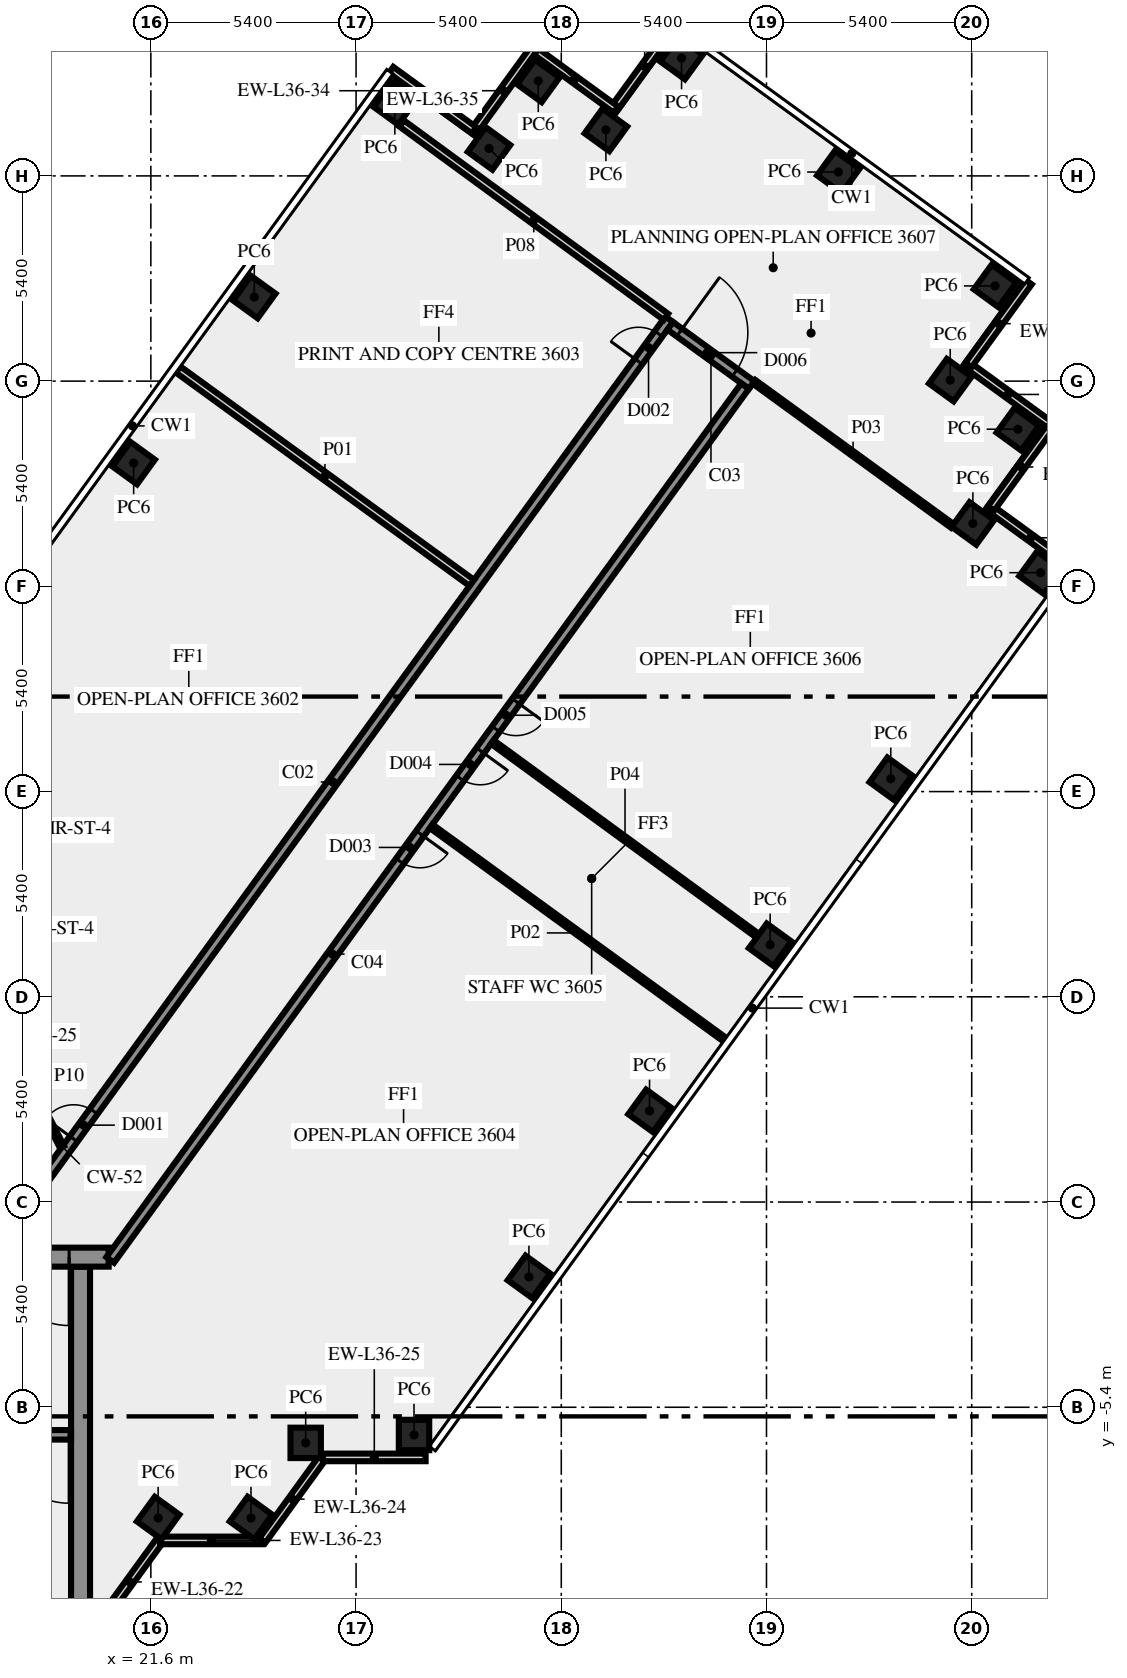
"""IFC4 building model, lengths in metres.
Left out: names, types, materials, properties, quantities, classifications, styles, units other than length and angle.
Written with IfcOpenShell. Run it as: python <this file> out.ifc"""

import sys

from ifc_helpers import new_model, si_unit, direction, frame, frame_2d, origin, origin_2d, place, context, subcontext, project, spatial, rectangle, extrude, element, fill, save


model = new_model("IFC4")
c1 = context("Model", 3, precision=1e-05, world=origin(), true_north=direction((0.0, 1.0)))
c2 = subcontext(c1, "Body", "Model", "MODEL_VIEW")
j1 = project(units=[si_unit("LENGTHUNIT", "METRE"), si_unit("PLANEANGLEUNIT", "RADIAN")], contexts=[c1])
p1 = place(None, origin())
s1 = spatial("IfcSite", under=j1, at=p1, CompositionType="ELEMENT")
p2 = place(p1, origin())
s2 = spatial("IfcBuilding", under=s1, at=p2, CompositionType="ELEMENT")
p3 = place(p2, frame((0.0, 0.0, 156.0)))
s3 = spatial("IfcBuildingStorey", under=s2, at=p3, CompositionType="ELEMENT", Elevation=156.0)
for number, where, z_axis, x_axis in (
    (1, (21.792, -8.315, 0.0), (0.0, 0.0, 1.0), (0.588, 0.809, 0.0)),
    (2, (24.235, -8.315, 0.0), (0.0, 0.0, 1.0), (0.588, 0.809, 0.0)),
    (3, (25.674, -6.337, 0.0), (0.0, 0.0, 1.0), (1.0, 0.0, 0.0)),
    (4, (28.525, -6.13, 0.0), (0.0, 0.0, 1.0), (1.0, 0.0, 0.0)),
    (5, (31.548, -1.969, 0.0), (0.0, 0.0, 1.0), (0.588, 0.809, 0.0)),
    (6, (34.722, 2.4, 0.0), (0.0, 0.0, 1.0), (0.588, 0.809, 0.0)),
    (7, (37.896, 6.769, 0.0), (0.0, 0.0, 1.0), (0.588, 0.809, 0.0)),
    (8, (41.07, 11.137, 0.0), (0.0, 0.0, 1.0), (0.588, 0.809, 0.0)),
    (9, (45.01, 16.56, 0.0), (0.0, 0.0, 1.0), (0.588, 0.809, 0.0)),
    (10, (43.231, 17.854, 0.0), (0.0, 0.0, 1.0), (0.588, 0.809, 0.0)),
    (11, (44.415, 20.335, 0.0), (0.0, 0.0, 1.0), (0.588, 0.809, 0.0)),
    (12, (42.635, 21.626, 0.0), (0.0, 0.0, 1.0), (-0.809, 0.588, 0.0)),
    (13, (43.815, 24.105, 0.0), (0.0, 0.0, 1.0), (-0.809, 0.588, 0.0)),
    (14, (39.691, 27.102, 0.0), (0.0, 0.0, 1.0), (-0.809, 0.588, 0.0)),
    (15, (35.565, 30.1, 0.0), (0.0, 0.0, 1.0), (-0.588, -0.809, 0.0)),
    (16, (33.574, 28.209, 0.0), (0.0, 0.0, 1.0), (-0.809, 0.588, 0.0)),
    (17, (31.795, 29.5, 0.0), (0.0, 0.0, 1.0), (-0.588, -0.809, 0.0)),
    (18, (30.499, 27.723, 0.0), (0.0, 0.0, 1.0), (-0.809, 0.588, 0.0)),
    (19, (28.02, 28.905, 0.0), (0.0, 0.0, 1.0), (-0.809, 0.588, 0.0)),
    (20, (24.321, 23.812, 0.0), (0.0, 0.0, 1.0), (-0.588, -0.809, 0.0)),
    (21, (21.147, 19.444, 0.0), (0.0, 0.0, 1.0), (-0.588, -0.809, 0.0)),
):
    element("IfcColumn", number, at=place(p3, frame(where, z_axis=z_axis, x_axis=x_axis)), inside=s3, PredefinedType="COLUMN", context=c2, shape_type="SweptSolid", body=[
        extrude(rectangle(XDim=0.8, YDim=0.8, at=origin_2d()), origin(), (0.0, 0.0, 1.0), 3.65),
    ])
p4 = place(p3, frame((20.253, -11.083, 0.0), z_axis=(0.0, 0.0, 1.0), x_axis=(0.587766567315, 0.809030569476, 0.0)))
e22 = element("IfcWall", 22, at=p4, inside=s3, PredefinedType="SOLIDWALL", context=c2, shape_type="SweptSolid", body=[
    extrude(rectangle(XDim=2.688, YDim=0.2, at=frame_2d((1.344, 0.0))), origin(), (0.0, 0.0, 1.0), 3.65),
])
p5 = place(p3, frame((21.843, -8.904, 0.0), z_axis=(0.0, 0.0, 1.0), x_axis=(1.0, 0.0, 0.0)))
e23 = element("IfcWall", 23, at=p5, inside=s3, PredefinedType="SOLIDWALL", context=c2, shape_type="SweptSolid", body=[
    extrude(rectangle(XDim=2.7, YDim=0.2, at=frame_2d((1.35, 0.0))), origin(), (0.0, 0.0, 1.0), 3.65),
])
p6 = place(p3, frame((24.533, -8.909, 0.0), z_axis=(0.0, 0.0, 1.0), x_axis=(0.587720002413, 0.809064397168, 0.0)))
e24 = element("IfcWall", 24, at=p6, inside=s3, PredefinedType="SOLIDWALL", context=c2, shape_type="SweptSolid", body=[
    extrude(rectangle(XDim=2.7, YDim=0.2, at=frame_2d((1.35, 0.0))), origin(), (0.0, 0.0, 1.0), 3.65),
])
for number, where, z_axis, x_axis in (
    (25, (26.13, -6.719, 0.0), (0.0, 0.0, 1.0), (1.0, 0.0, 0.0)),
    (26, (45.842, 16.685, 0.0), (0.0, 0.0, 1.0), (-0.809, 0.588, 0.0)),
    (27, (43.709, 18.249, 0.0), (0.0, 0.0, 1.0), (0.588, 0.809, 0.0)),
    (28, (45.245, 20.456, 0.0), (0.0, 0.0, 1.0), (-0.809, 0.588, 0.0)),
    (29, (43.113, 22.02, 0.0), (0.0, 0.0, 1.0), (0.588, 0.809, 0.0)),
    (30, (35.388, 30.97, 0.0), (0.0, 0.0, 1.0), (-0.588, -0.809, 0.0)),
    (31, (33.838, 28.744, 0.0), (0.0, 0.0, 1.0), (-0.809, 0.588, 0.0)),
    (32, (31.67, 30.333, 0.0), (0.0, 0.0, 1.0), (-0.588, -0.809, 0.0)),
    (33, (30.106, 28.2, 0.0), (0.0, 0.0, 1.0), (-0.809, 0.588, 0.0)),
):
    element("IfcWall", number, at=place(p3, frame(where, z_axis=z_axis, x_axis=x_axis)), inside=s3, PredefinedType="SOLIDWALL", context=c2, shape_type="SweptSolid", body=[
        extrude(rectangle(XDim=2.7, YDim=0.2, at=frame_2d((1.35, 0.0))), origin(), (0.0, 0.0, 1.0), 3.65),
    ])
p7 = place(p3, frame((19.75, -10.5, 0.0), z_axis=(0.0, 0.0, 1.0), x_axis=(0.0, 1.0, 0.0)))
e34 = element("IfcWall", 34, at=p7, inside=s3, PredefinedType="SHEAR", context=c2, shape_type="SweptSolid", body=[
    extrude(rectangle(XDim=8.8, YDim=0.5, at=frame_2d((4.4, 0.0))), origin(), (0.0, 0.0, 1.0), 3.65),
])
p8 = place(p3, frame((19.5, -6.125, 0.0), z_axis=(0.0, 0.0, 1.0), x_axis=(-1.0, 0.0, 0.0)))
e35 = element("IfcWall", 35, at=p8, inside=s3, PredefinedType="SHEAR", context=c2, shape_type="SweptSolid", body=[
    extrude(rectangle(XDim=8.05, YDim=0.25, at=frame_2d((4.025, 0.0))), origin(), (0.0, 0.0, 1.0), 3.65),
])
p9 = place(p8, frame((0.05, 0.0, 0.0)))
e36 = element("IfcOpeningElement", 36, at=p9, cuts=e35, PredefinedType="OPENING", context=c2, shape_type="SweptSolid", body=[
    extrude(rectangle(XDim=1.8, YDim=2.1, at=frame_2d((0.9, 1.05))), frame((0.0, 0.135, 0.0), z_axis=(0.0, -1.0, 0.0), x_axis=(1.0, 0.0, 0.0)), (0.0, 0.0, 1.0), 0.27),
])
p10 = place(p3, frame((20.49, -1.45, 0.0), z_axis=(0.0, 0.0, 1.0), x_axis=(-1.0, 0.0, 0.0)))
e37 = element("IfcWall", 37, at=p10, inside=s3, PredefinedType="SHEAR", context=c2, shape_type="SweptSolid", body=[
    extrude(rectangle(XDim=40.98, YDim=0.5, at=frame_2d((20.49, 0.0))), origin(), (0.0, 0.0, 1.0), 3.65),
])
p11 = place(p10, frame((38.14, 0.0, 0.0)))
e38 = element("IfcOpeningElement", 38, at=p11, cuts=e37, PredefinedType="OPENING", context=c2, shape_type="SweptSolid", body=[
    extrude(rectangle(XDim=1.8, YDim=2.1, at=frame_2d((0.9, 1.05))), frame((0.0, 0.26, 0.0), z_axis=(0.0, -1.0, 0.0), x_axis=(1.0, 0.0, 0.0)), (0.0, 0.0, 1.0), 0.52),
])
p12 = place(p10, frame((35.89, 0.0, 0.0)))
e39 = element("IfcOpeningElement", 39, at=p12, cuts=e37, PredefinedType="OPENING", context=c2, shape_type="SweptSolid", body=[
    extrude(rectangle(XDim=0.9, YDim=2.1, at=frame_2d((0.45, 1.05))), frame((0.0, 0.26, 0.0), z_axis=(0.0, -1.0, 0.0), x_axis=(1.0, 0.0, 0.0)), (0.0, 0.0, 1.0), 0.52),
])
p13 = place(p10, frame((32.94, 0.0, 0.0)))
e40 = element("IfcOpeningElement", 40, at=p13, cuts=e37, PredefinedType="OPENING", context=c2, shape_type="SweptSolid", body=[
    extrude(rectangle(XDim=0.9, YDim=2.1, at=frame_2d((0.45, 1.05))), frame((0.0, 0.26, 0.0), z_axis=(0.0, -1.0, 0.0), x_axis=(1.0, 0.0, 0.0)), (0.0, 0.0, 1.0), 0.52),
])
p14 = place(p10, frame((28.802, 0.0, 0.0)))
e41 = element("IfcOpeningElement", 41, at=p14, cuts=e37, PredefinedType="OPENING", context=c2, shape_type="SweptSolid", body=[
    extrude(rectangle(XDim=0.9, YDim=2.1, at=frame_2d((0.45, 1.05))), frame((0.0, 0.26, 0.0), z_axis=(0.0, -1.0, 0.0), x_axis=(1.0, 0.0, 0.0)), (0.0, 0.0, 1.0), 0.52),
])
p15 = place(p10, frame((25.077, 0.0, 0.0)))
e42 = element("IfcOpeningElement", 42, at=p15, cuts=e37, PredefinedType="OPENING", context=c2, shape_type="SweptSolid", body=[
    extrude(rectangle(XDim=0.9, YDim=2.1, at=frame_2d((0.45, 1.05))), frame((0.0, 0.26, 0.0), z_axis=(0.0, -1.0, 0.0), x_axis=(1.0, 0.0, 0.0)), (0.0, 0.0, 1.0), 0.52),
])
p16 = place(p10, frame((21.765, 0.0, 0.0)))
e43 = element("IfcOpeningElement", 43, at=p16, cuts=e37, PredefinedType="OPENING", context=c2, shape_type="SweptSolid", body=[
    extrude(rectangle(XDim=2.0, YDim=2.1, at=frame_2d((1.0, 1.05))), frame((0.0, 0.26, 0.0), z_axis=(0.0, -1.0, 0.0), x_axis=(1.0, 0.0, 0.0)), (0.0, 0.0, 1.0), 0.52),
])
p17 = place(p10, frame((7.14, 0.0, 0.0)))
e44 = element("IfcOpeningElement", 44, at=p17, cuts=e37, PredefinedType="OPENING", context=c2, shape_type="SweptSolid", body=[
    extrude(rectangle(XDim=0.9, YDim=2.1, at=frame_2d((0.45, 1.05))), frame((0.0, 0.26, 0.0), z_axis=(0.0, -1.0, 0.0), x_axis=(1.0, 0.0, 0.0)), (0.0, 0.0, 1.0), 0.52),
])
p18 = place(p10, frame((5.028, 0.0, 0.0)))
e45 = element("IfcOpeningElement", 45, at=p18, cuts=e37, PredefinedType="OPENING", context=c2, shape_type="SweptSolid", body=[
    extrude(rectangle(XDim=0.8, YDim=2.1, at=frame_2d((0.4, 1.05))), frame((0.0, 0.26, 0.0), z_axis=(0.0, -1.0, 0.0), x_axis=(1.0, 0.0, 0.0)), (0.0, 0.0, 1.0), 0.52),
])
p19 = place(p10, frame((3.452, 0.0, 0.0)))
e46 = element("IfcOpeningElement", 46, at=p19, cuts=e37, PredefinedType="OPENING", context=c2, shape_type="SweptSolid", body=[
    extrude(rectangle(XDim=0.8, YDim=2.1, at=frame_2d((0.4, 1.05))), frame((0.0, 0.26, 0.0), z_axis=(0.0, -1.0, 0.0), x_axis=(1.0, 0.0, 0.0)), (0.0, 0.0, 1.0), 0.52),
])
p20 = place(p10, frame((1.04, 0.0, 0.0)))
e47 = element("IfcOpeningElement", 47, at=p20, cuts=e37, PredefinedType="OPENING", context=c2, shape_type="SweptSolid", body=[
    extrude(rectangle(XDim=1.8, YDim=2.1, at=frame_2d((0.9, 1.05))), frame((0.0, 0.26, 0.0), z_axis=(0.0, -1.0, 0.0), x_axis=(1.0, 0.0, 0.0)), (0.0, 0.0, 1.0), 0.52),
])
p21 = place(p3, frame((17.545, -1.125, 0.0), z_axis=(0.0, 0.0, 1.0), x_axis=(0.587786330937, 0.809016210693, 0.0)))
e48 = element("IfcWall", 48, at=p21, inside=s3, PredefinedType="SOLIDWALL", context=c2, shape_type="SweptSolid", body=[
    extrude(rectangle(XDim=30.103, YDim=0.25, at=frame_2d((15.052, 0.0))), origin(), (0.0, 0.0, 1.0), 3.65),
])
p22 = place(p21, frame((3.441, 0.0, 0.0)))
e49 = element("IfcOpeningElement", 49, at=p22, cuts=e48, PredefinedType="OPENING", context=c2, shape_type="SweptSolid", body=[
    extrude(rectangle(XDim=0.9, YDim=2.1, at=frame_2d((0.45, 1.05))), frame((0.0, 0.135, 0.0), z_axis=(0.0, -1.0, 0.0), x_axis=(1.0, 0.0, 0.0)), (0.0, 0.0, 1.0), 0.27),
])
p23 = place(p21, frame((28.729, 0.0, 0.0)))
e50 = element("IfcOpeningElement", 50, at=p23, cuts=e48, PredefinedType="OPENING", context=c2, shape_type="SweptSolid", body=[
    extrude(rectangle(XDim=0.9, YDim=2.1, at=frame_2d((0.45, 1.05))), frame((0.0, 0.135, 0.0), z_axis=(0.0, -1.0, 0.0), x_axis=(1.0, 0.0, 0.0)), (0.0, 0.0, 1.0), 0.27),
])
p24 = place(p3, frame((35.267, 23.054, 0.0), z_axis=(0.0, 0.0, 1.0), x_axis=(0.809038743598, -0.587755315891, 0.0)))
e51 = element("IfcWall", 51, at=p24, inside=s3, PredefinedType="SOLIDWALL", context=c2, shape_type="SweptSolid", body=[
    extrude(rectangle(XDim=2.65, YDim=0.25, at=frame_2d((1.325, 0.0))), origin(), (0.0, 0.0, 1.0), 3.65),
])
p25 = place(p24, frame((0.3, 0.0, 0.0)))
e52 = element("IfcOpeningElement", 52, at=p25, cuts=e51, PredefinedType="OPENING", context=c2, shape_type="SweptSolid", body=[
    extrude(rectangle(XDim=1.8, YDim=2.1, at=frame_2d((0.9, 1.05))), frame((0.0, 0.135, 0.0), z_axis=(0.0, -1.0, 0.0), x_axis=(1.0, 0.0, 0.0)), (0.0, 0.0, 1.0), 0.27),
])
p26 = place(p3, frame((37.236, 21.469, 0.0), z_axis=(0.0, 0.0, 1.0), x_axis=(-0.58778344073, -0.809018310549, 0.0)))
e53 = element("IfcWall", 53, at=p26, inside=s3, PredefinedType="SOLIDWALL", context=c2, shape_type="SweptSolid", body=[
    extrude(rectangle(XDim=28.42, YDim=0.25, at=frame_2d((14.21, 0.0))), origin(), (0.0, 0.0, 1.0), 3.65),
])
p27 = place(p26, frame((14.554, 0.0, 0.0)))
e54 = element("IfcOpeningElement", 54, at=p27, cuts=e53, PredefinedType="OPENING", context=c2, shape_type="SweptSolid", body=[
    extrude(rectangle(XDim=0.9, YDim=2.1, at=frame_2d((0.45, 1.05))), frame((0.0, 0.135, 0.0), z_axis=(0.0, -1.0, 0.0), x_axis=(1.0, 0.0, 0.0)), (0.0, 0.0, 1.0), 0.27),
])
p28 = place(p26, frame((10.255, 0.0, 0.0)))
e55 = element("IfcOpeningElement", 55, at=p28, cuts=e53, PredefinedType="OPENING", context=c2, shape_type="SweptSolid", body=[
    extrude(rectangle(XDim=0.9, YDim=2.1, at=frame_2d((0.45, 1.05))), frame((0.0, 0.135, 0.0), z_axis=(0.0, -1.0, 0.0), x_axis=(1.0, 0.0, 0.0)), (0.0, 0.0, 1.0), 0.27),
])
p29 = place(p26, frame((11.854, 0.0, 0.0)))
e56 = element("IfcOpeningElement", 56, at=p29, cuts=e53, PredefinedType="OPENING", context=c2, shape_type="SweptSolid", body=[
    extrude(rectangle(XDim=0.9, YDim=2.1, at=frame_2d((0.45, 1.05))), frame((0.0, 0.135, 0.0), z_axis=(0.0, -1.0, 0.0), x_axis=(1.0, 0.0, 0.0)), (0.0, 0.0, 1.0), 0.27),
])
p30 = place(p3, frame((30.044, 16.292, 0.0), z_axis=(0.0, 0.0, 1.0), x_axis=(-0.80898585166, 0.587828114175, 0.0)))
e57 = element("IfcWall", 57, at=p30, inside=s3, PredefinedType="SOLIDWALL", context=c2, shape_type="SweptSolid", body=[
    extrude(rectangle(XDim=9.55, YDim=0.2, at=frame_2d((4.775, 0.0))), origin(), (0.0, 0.0, 1.0), 2.85),
])
p31 = place(p3, frame((36.702, 4.274, 0.0), z_axis=(0.0, 0.0, 1.0), x_axis=(-0.808998008689, 0.58781138296, 0.0)))
e58 = element("IfcWall", 58, at=p31, inside=s3, PredefinedType="PARTITIONING", context=c2, shape_type="SweptSolid", body=[
    extrude(rectangle(XDim=9.55, YDim=0.12, at=frame_2d((4.775, 0.0))), origin(), (0.0, 0.0, 1.0), 2.85),
])
p32 = place(p3, frame((42.686, 17.794, 0.0), z_axis=(0.0, 0.0, 1.0), x_axis=(-0.809017755079, 0.587784205272, 0.0)))
e59 = element("IfcWall", 59, at=p32, inside=s3, PredefinedType="PARTITIONING", context=c2, shape_type="SweptSolid", body=[
    extrude(rectangle(XDim=6.445, YDim=0.12, at=frame_2d((3.222, 0.0))), origin(), (0.0, 0.0, 1.0), 3.65),
])
p33 = place(p3, frame((30.587, 12.104, 0.0), z_axis=(0.0, 0.0, 1.0), x_axis=(0.807584089733, -0.589752437902, 0.0)))
e60 = element("IfcWall", 60, at=p33, inside=s3, PredefinedType="PARTITIONING", context=c2, shape_type="SweptSolid", body=[
    extrude(rectangle(XDim=8.645, YDim=0.12, at=frame_2d((4.322, 0.0))), origin(), (0.0, 0.0, 1.0), 3.65),
])
p34 = place(p3, frame((28.198, 28.381, 0.0), z_axis=(0.0, 0.0, 1.0), x_axis=(0.806977317905, -0.590582431492, 0.0)))
e61 = element("IfcWall", 61, at=p34, inside=s3, PredefinedType="SOLIDWALL", context=c2, shape_type="SweptSolid", body=[
    extrude(rectangle(XDim=8.62, YDim=0.2, at=frame_2d((4.31, 0.0))), origin(), (0.0, 0.0, 1.0), 3.65),
])
p35 = place(p3, frame((18.0, 3.925, 0.0), z_axis=(0.0, 0.0, 1.0), x_axis=(0.453950796792, -0.891026752736, 0.0)))
e62 = element("IfcWall", 62, at=p35, inside=s3, PredefinedType="PARTITIONING", context=c2, shape_type="SweptSolid", body=[
    extrude(rectangle(XDim=2.778, YDim=0.12, at=frame_2d((1.389, 0.0))), origin(), (0.0, 0.0, 1.0), 3.65),
])
p36 = place(p9, origin())
e63 = element("IfcDoor", 63, at=p36, inside=s3, OperationType="DOUBLE_DOOR_SINGLE_SWING", PredefinedType="DOOR", context=c2, shape_type="SweptSolid", body=[
    extrude(rectangle(XDim=1.8, YDim=2.1, at=frame_2d((0.9, 1.05))), frame((0.0, 0.025, 0.0), z_axis=(0.0, -1.0, 0.0), x_axis=(1.0, 0.0, 0.0)), (0.0, 0.0, 1.0), 0.05),
])
fill(e36, e63)
p37 = place(p20, origin())
e64 = element("IfcDoor", 64, at=p37, inside=s3, OperationType="DOUBLE_DOOR_SINGLE_SWING", PredefinedType="DOOR", context=c2, shape_type="SweptSolid", body=[
    extrude(rectangle(XDim=1.8, YDim=2.1, at=frame_2d((0.9, 1.05))), frame((0.0, 0.025, 0.0), z_axis=(0.0, -1.0, 0.0), x_axis=(1.0, 0.0, 0.0)), (0.0, 0.0, 1.0), 0.05),
])
fill(e47, e64)
p38 = place(p22, origin())
e65 = element("IfcDoor", 65, at=p38, inside=s3, OperationType="SINGLE_SWING_LEFT", PredefinedType="DOOR", context=c2, shape_type="SweptSolid", body=[
    extrude(rectangle(XDim=0.9, YDim=2.1, at=frame_2d((0.45, 1.05))), frame((0.0, 0.025, 0.0), z_axis=(0.0, -1.0, 0.0), x_axis=(1.0, 0.0, 0.0)), (0.0, 0.0, 1.0), 0.05),
])
fill(e49, e65)
p39 = place(p27, origin())
e66 = element("IfcDoor", 66, at=p39, inside=s3, OperationType="SINGLE_SWING_LEFT", PredefinedType="DOOR", context=c2, shape_type="SweptSolid", body=[
    extrude(rectangle(XDim=0.9, YDim=2.1, at=frame_2d((0.45, 1.05))), frame((0.0, 0.025, 0.0), z_axis=(0.0, -1.0, 0.0), x_axis=(1.0, 0.0, 0.0)), (0.0, 0.0, 1.0), 0.05),
])
fill(e54, e66)
p40 = place(p28, origin())
e67 = element("IfcDoor", 67, at=p40, inside=s3, OperationType="SINGLE_SWING_RIGHT", PredefinedType="DOOR", context=c2, shape_type="SweptSolid", body=[
    extrude(rectangle(XDim=0.9, YDim=2.1, at=frame_2d((0.45, 1.05))), frame((0.0, 0.025, 0.0), z_axis=(0.0, -1.0, 0.0), x_axis=(1.0, 0.0, 0.0)), (0.0, 0.0, 1.0), 0.05),
])
fill(e55, e67)
p41 = place(p25, origin())
e68 = element("IfcDoor", 68, at=p41, inside=s3, OperationType="DOUBLE_DOOR_SINGLE_SWING", PredefinedType="DOOR", context=c2, shape_type="SweptSolid", body=[
    extrude(rectangle(XDim=1.8, YDim=2.1, at=frame_2d((0.9, 1.05))), frame((0.0, 0.025, 0.0), z_axis=(0.0, -1.0, 0.0), x_axis=(1.0, 0.0, 0.0)), (0.0, 0.0, 1.0), 0.05),
])
fill(e52, e68)
p42 = place(p23, origin())
e69 = element("IfcDoor", 69, at=p42, inside=s3, OperationType="SINGLE_SWING_RIGHT", PredefinedType="DOOR", context=c2, shape_type="SweptSolid", body=[
    extrude(rectangle(XDim=0.9, YDim=2.1, at=frame_2d((0.45, 1.05))), frame((0.0, 0.025, 0.0), z_axis=(0.0, -1.0, 0.0), x_axis=(1.0, 0.0, 0.0)), (0.0, 0.0, 1.0), 0.05),
])
fill(e50, e69)
p43 = place(p29, origin())
e70 = element("IfcDoor", 70, at=p43, inside=s3, OperationType="SINGLE_SWING_LEFT", PredefinedType="DOOR", context=c2, shape_type="SweptSolid", body=[
    extrude(rectangle(XDim=0.9, YDim=2.1, at=frame_2d((0.45, 1.05))), frame((0.0, 0.025, 0.0), z_axis=(0.0, -1.0, 0.0), x_axis=(1.0, 0.0, 0.0)), (0.0, 0.0, 1.0), 0.05),
])
fill(e56, e70)
save(model, sys.argv[1])
